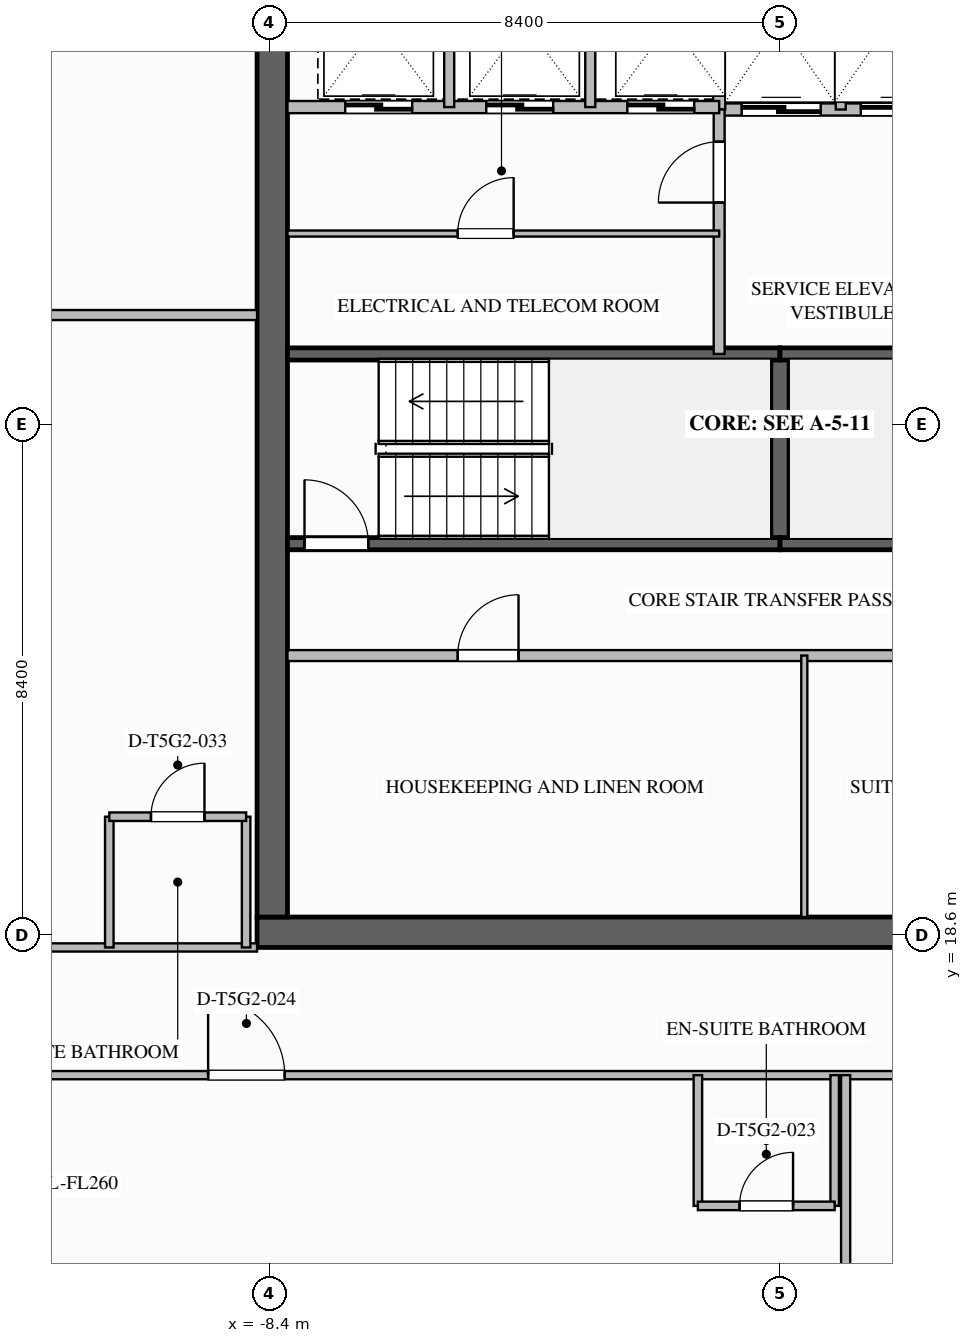
"""IFC4 building model, lengths in metres.
Left out: names, types, materials, properties, quantities, classifications, styles, units other than length and angle.
Written with IfcOpenShell. Run it as: python <this file> out.ifc"""

import sys

from ifc_helpers import new_model, si_unit, direction, frame, frame_2d, origin, place, context, subcontext, project, spatial, rectangle, extrude, element, fill, save


model = new_model("IFC4")
c1 = context("Model", 3, precision=1e-05, world=origin(), true_north=direction((0.0, 1.0)))
c2 = subcontext(c1, "Body", "Model", "MODEL_VIEW")
j1 = project(units=[si_unit("LENGTHUNIT", "METRE"), si_unit("PLANEANGLEUNIT", "RADIAN")], contexts=[c1])
p1 = place(None, origin())
s1 = spatial("IfcSite", under=j1, at=p1, CompositionType="ELEMENT")
p2 = place(p1, origin())
s2 = spatial("IfcBuilding", under=s1, at=p2, CompositionType="ELEMENT")
p3 = place(p2, frame((0.0, 0.0, 275.95)))
s3 = spatial("IfcBuildingStorey", under=s2, at=p3, CompositionType="ELEMENT", Elevation=275.95)
p4 = place(p3, frame((8.6, 18.65, 0.0), z_axis=(0.0, 0.0, 1.0), x_axis=(-1.0, 0.0, 0.0)))
e1 = element("IfcWall", 1, at=p4, inside=s3, PredefinedType="SHEAR", context=c2, shape_type="SweptSolid", body=[
    extrude(rectangle(XDim=17.2, YDim=0.5, at=frame_2d((8.6, 0.0))), origin(), (0.0, 0.0, 1.0), 3.65),
])
p5 = place(p3, frame((-8.35, 18.9, 0.0), z_axis=(0.0, 0.0, 1.0), x_axis=(0.0, 1.0, 0.0)))
e2 = element("IfcWall", 2, at=p5, inside=s3, PredefinedType="SHEAR", context=c2, shape_type="SweptSolid", body=[
    extrude(rectangle(XDim=16.2, YDim=0.5, at=frame_2d((8.1, 0.0))), origin(), (0.0, 0.0, 1.0), 3.65),
])
p6 = place(p3, frame((0.0, 25.04, 0.0), z_axis=(0.0, 0.0, 1.0), x_axis=(0.0, 1.0, 0.0)))
e3 = element("IfcWall", 3, at=p6, inside=s3, PredefinedType="SOLIDWALL", context=c2, shape_type="SweptSolid", body=[
    extrude(rectangle(XDim=3.12, YDim=0.3, at=frame_2d((1.56, 0.0))), origin(), (0.0, 0.0, 1.0), 3.39),
])
p7 = place(p3, frame((-8.1, 25.04, 0.0), z_axis=(0.0, 0.0, 1.0), x_axis=(1.0, 0.0, 0.0)))
e4 = element("IfcWall", 4, at=p7, inside=s3, PredefinedType="SOLIDWALL", context=c2, shape_type="SweptSolid", body=[
    extrude(rectangle(XDim=8.1, YDim=0.2, at=frame_2d((4.05, 0.0))), origin(), (0.0, 0.0, 1.0), 3.39),
])
p8 = place(p7, frame((0.28, 0.0, 0.0)))
e5 = element("IfcOpeningElement", 5, at=p8, cuts=e4, PredefinedType="OPENING", context=c2, shape_type="SweptSolid", body=[
    extrude(rectangle(XDim=1.05, YDim=2.1, at=frame_2d((0.525, 1.05))), frame((0.0, 0.11, 0.0), z_axis=(0.0, -1.0, 0.0), x_axis=(1.0, 0.0, 0.0)), (0.0, 0.0, 1.0), 0.22),
])
for number, where, z_axis, x_axis in (
    (6, (-8.1, 28.16, 0.0), (0.0, 0.0, 1.0), (1.0, 0.0, 0.0)),
    (7, (0.0, 25.04, 0.0), (0.0, 0.0, 1.0), (1.0, 0.0, 0.0)),
):
    element("IfcWall", number, at=place(p3, frame(where, z_axis=z_axis, x_axis=x_axis)), inside=s3, PredefinedType="SOLIDWALL", context=c2, shape_type="SweptSolid", body=[
        extrude(rectangle(XDim=8.1, YDim=0.2, at=frame_2d((4.05, 0.0))), origin(), (0.0, 0.0, 1.0), 3.39),
    ])
p9 = place(p3, frame((8.1, 28.16, 0.0), z_axis=(0.0, 0.0, 1.0), x_axis=(-1.0, 0.0, 0.0)))
e8 = element("IfcWall", 8, at=p9, inside=s3, PredefinedType="SOLIDWALL", context=c2, shape_type="SweptSolid", body=[
    extrude(rectangle(XDim=8.1, YDim=0.2, at=frame_2d((4.05, 0.0))), origin(), (0.0, 0.0, 1.0), 3.39),
])
p10 = place(p9, frame((0.28, 0.0, 0.0)))
e9 = element("IfcOpeningElement", 9, at=p10, cuts=e8, PredefinedType="OPENING", context=c2, shape_type="SweptSolid", body=[
    extrude(rectangle(XDim=1.05, YDim=2.1, at=frame_2d((0.525, 1.05))), frame((0.0, 0.11, 0.0), z_axis=(0.0, -1.0, 0.0), x_axis=(1.0, 0.0, 0.0)), (0.0, 0.0, 1.0), 0.22),
])
p11 = place(p3, frame((-1.0, 32.18, 0.0), z_axis=(0.0, 0.0, 1.0), x_axis=(1.0, 0.0, 0.0)))
e10 = element("IfcWall", 10, at=p11, inside=s3, PredefinedType="SOLIDWALL", context=c2, shape_type="SweptSolid", body=[
    extrude(rectangle(XDim=4.1, YDim=0.2, at=frame_2d((2.05, 0.0))), origin(), (0.0, 0.0, 1.0), 3.39),
])
p12 = place(p11, frame((0.37, 0.0, 0.0)))
e11 = element("IfcOpeningElement", 11, at=p12, cuts=e10, PredefinedType="OPENING", context=c2, shape_type="SweptSolid", body=[
    extrude(rectangle(XDim=1.3, YDim=2.2, at=frame_2d((0.65, 1.1))), frame((0.0, 0.11, 0.0), z_axis=(0.0, -1.0, 0.0), x_axis=(1.0, 0.0, 0.0)), (0.0, 0.0, 1.0), 0.22),
])
p13 = place(p11, frame((2.33, 0.0, 0.0)))
e12 = element("IfcOpeningElement", 12, at=p13, cuts=e10, PredefinedType="OPENING", context=c2, shape_type="SweptSolid", body=[
    extrude(rectangle(XDim=1.3, YDim=2.2, at=frame_2d((0.65, 1.1))), frame((0.0, 0.11, 0.0), z_axis=(0.0, -1.0, 0.0), x_axis=(1.0, 0.0, 0.0)), (0.0, 0.0, 1.0), 0.22),
])
p14 = place(p3, frame((-1.0, 32.18, 0.0), z_axis=(0.0, 0.0, 1.0), x_axis=(0.0, 1.0, 0.0)))
e13 = element("IfcWall", 13, at=p14, inside=s3, PredefinedType="SOLIDWALL", context=c2, shape_type="SweptSolid", body=[
    extrude(rectangle(XDim=2.92, YDim=0.2, at=frame_2d((1.46, 0.0))), origin(), (0.0, 0.0, 1.0), 3.39),
])
p15 = place(p3, frame((1.0, 32.18, 0.0), z_axis=(0.0, 0.0, 1.0), x_axis=(0.0, 1.0, 0.0)))
e14 = element("IfcWall", 14, at=p15, inside=s3, PredefinedType="PARTITIONING", context=c2, shape_type="SweptSolid", body=[
    extrude(rectangle(XDim=2.92, YDim=0.165, at=frame_2d((1.46, 0.0))), origin(), (0.0, 0.0, 1.0), 3.39),
])
p16 = place(p3, frame((-1.0, 28.16, 0.0), z_axis=(0.0, 0.0, 1.0), x_axis=(0.0, 1.0, 0.0)))
e15 = element("IfcWall", 15, at=p16, inside=s3, PredefinedType="SOLIDWALL", context=c2, shape_type="SweptSolid", body=[
    extrude(rectangle(XDim=4.02, YDim=0.18, at=frame_2d((2.01, 0.0))), origin(), (0.0, 0.0, 1.0), 3.39),
])
p17 = place(p16, frame((2.49, 0.0, 0.0)))
e16 = element("IfcOpeningElement", 16, at=p17, cuts=e15, PredefinedType="OPENING", context=c2, shape_type="SweptSolid", body=[
    extrude(rectangle(XDim=1.0, YDim=2.1, at=frame_2d((0.5, 1.05))), frame((0.0, 0.1, 0.0), z_axis=(0.0, -1.0, 0.0), x_axis=(1.0, 0.0, 0.0)), (0.0, 0.0, 1.0), 0.2),
])
p18 = place(p3, frame((-8.1, 32.22, 0.0), z_axis=(0.0, 0.0, 1.0), x_axis=(1.0, 0.0, 0.0)))
e17 = element("IfcWall", 17, at=p18, inside=s3, PredefinedType="SOLIDWALL", context=c2, shape_type="SweptSolid", body=[
    extrude(rectangle(XDim=7.1, YDim=0.2, at=frame_2d((3.55, 0.0))), origin(), (0.0, 0.0, 1.0), 3.39),
])
p19 = place(p18, frame((0.95, 0.0, 0.0)))
e18 = element("IfcOpeningElement", 18, at=p19, cuts=e17, PredefinedType="OPENING", context=c2, shape_type="SweptSolid", body=[
    extrude(rectangle(XDim=1.1, YDim=2.2, at=frame_2d((0.55, 1.1))), frame((0.0, 0.11, 0.0), z_axis=(0.0, -1.0, 0.0), x_axis=(1.0, 0.0, 0.0)), (0.0, 0.0, 1.0), 0.22),
])
p20 = place(p18, frame((3.27, 0.0, 0.0)))
e19 = element("IfcOpeningElement", 19, at=p20, cuts=e17, PredefinedType="OPENING", context=c2, shape_type="SweptSolid", body=[
    extrude(rectangle(XDim=1.1, YDim=2.2, at=frame_2d((0.55, 1.1))), frame((0.0, 0.11, 0.0), z_axis=(0.0, -1.0, 0.0), x_axis=(1.0, 0.0, 0.0)), (0.0, 0.0, 1.0), 0.22),
])
p21 = place(p18, frame((5.59, 0.0, 0.0)))
e20 = element("IfcOpeningElement", 20, at=p21, cuts=e17, PredefinedType="OPENING", context=c2, shape_type="SweptSolid", body=[
    extrude(rectangle(XDim=1.1, YDim=2.2, at=frame_2d((0.55, 1.1))), frame((0.0, 0.11, 0.0), z_axis=(0.0, -1.0, 0.0), x_axis=(1.0, 0.0, 0.0)), (0.0, 0.0, 1.0), 0.22),
])
for number, where, z_axis, x_axis in (
    (21, (-5.44, 32.22, 0.0), (0.0, 0.0, 1.0), (0.0, 1.0, 0.0)),
    (22, (-3.12, 32.22, 0.0), (0.0, 0.0, 1.0), (0.0, 1.0, 0.0)),
):
    element("IfcWall", number, at=place(p3, frame(where, z_axis=z_axis, x_axis=x_axis)), inside=s3, PredefinedType="PARTITIONING", context=c2, shape_type="SweptSolid", body=[
        extrude(rectangle(XDim=2.88, YDim=0.165, at=frame_2d((1.44, 0.0))), origin(), (0.0, 0.0, 1.0), 3.39),
    ])
p22 = place(p3, frame((-8.1, 30.14, 0.0), z_axis=(0.0, 0.0, 1.0), x_axis=(1.0, 0.0, 0.0)))
e23 = element("IfcWall", 23, at=p22, inside=s3, PredefinedType="PARTITIONING", context=c2, shape_type="SweptSolid", body=[
    extrude(rectangle(XDim=7.1, YDim=0.1, at=frame_2d((3.55, 0.0))), origin(), (0.0, 0.0, 1.0), 3.39),
])
p23 = place(p22, frame((2.8, 0.0, 0.0)))
e24 = element("IfcOpeningElement", 24, at=p23, cuts=e23, PredefinedType="OPENING", context=c2, shape_type="SweptSolid", body=[
    extrude(rectangle(XDim=0.92, YDim=2.1, at=frame_2d((0.46, 1.05))), frame((0.0, 0.06, 0.0), z_axis=(0.0, -1.0, 0.0), x_axis=(1.0, 0.0, 0.0)), (0.0, 0.0, 1.0), 0.12),
])
p24 = place(p3, frame((-8.1, 23.2, 0.0), z_axis=(0.0, 0.0, 1.0), x_axis=(1.0, 0.0, 0.0)))
e25 = element("IfcWall", 25, at=p24, inside=s3, PredefinedType="SOLIDWALL", context=c2, shape_type="SweptSolid", body=[
    extrude(rectangle(XDim=16.2, YDim=0.18, at=frame_2d((8.1, 0.0))), origin(), (0.0, 0.0, 1.0), 3.39),
])
p25 = place(p24, frame((2.8, 0.0, 0.0)))
e26 = element("IfcOpeningElement", 26, at=p25, cuts=e25, PredefinedType="OPENING", context=c2, shape_type="SweptSolid", body=[
    extrude(rectangle(XDim=1.0, YDim=2.1, at=frame_2d((0.5, 1.05))), frame((0.0, 0.1, 0.0), z_axis=(0.0, -1.0, 0.0), x_axis=(1.0, 0.0, 0.0)), (0.0, 0.0, 1.0), 0.2),
])
p26 = place(p24, frame((11.5, 0.0, 0.0)))
e27 = element("IfcOpeningElement", 27, at=p26, cuts=e25, PredefinedType="OPENING", context=c2, shape_type="SweptSolid", body=[
    extrude(rectangle(XDim=1.0, YDim=2.1, at=frame_2d((0.5, 1.05))), frame((0.0, 0.1, 0.0), z_axis=(0.0, -1.0, 0.0), x_axis=(1.0, 0.0, 0.0)), (0.0, 0.0, 1.0), 0.2),
])
p27 = place(p3, frame((0.4, 18.9, 0.0), z_axis=(0.0, 0.0, 1.0), x_axis=(0.0, 1.0, 0.0)))
e28 = element("IfcWall", 28, at=p27, inside=s3, PredefinedType="PARTITIONING", context=c2, shape_type="SweptSolid", body=[
    extrude(rectangle(XDim=4.3, YDim=0.1, at=frame_2d((2.15, 0.0))), origin(), (0.0, 0.0, 1.0), 3.39),
])
p28 = place(p3, frame((-16.2, 16.3, 0.0), z_axis=(0.0, 0.0, 1.0), x_axis=(1.0, 0.0, 0.0)))
e29 = element("IfcWall", 29, at=p28, inside=s3, PredefinedType="PARTITIONING", context=c2, shape_type="SweptSolid", body=[
    extrude(rectangle(XDim=38.28, YDim=0.135, at=frame_2d((19.14, 0.0))), origin(), (0.0, 0.0, 1.0), 3.39),
])
p29 = place(p28, frame((33.355, 0.0, 0.0)))
e30 = element("IfcOpeningElement", 30, at=p29, cuts=e29, PredefinedType="OPENING", context=c2, shape_type="SweptSolid", body=[
    extrude(rectangle(XDim=1.26, YDim=2.2, at=frame_2d((0.63, 1.1))), frame((0.0, 0.077, 0.0), z_axis=(0.0, -1.0, 0.0), x_axis=(1.0, 0.0, 0.0)), (0.0, 0.0, 1.0), 0.155),
])
p30 = place(p28, frame((6.795, 0.0, 0.0)))
e31 = element("IfcOpeningElement", 31, at=p30, cuts=e29, PredefinedType="OPENING", context=c2, shape_type="SweptSolid", body=[
    extrude(rectangle(XDim=1.26, YDim=2.2, at=frame_2d((0.63, 1.1))), frame((0.0, 0.077, 0.0), z_axis=(0.0, -1.0, 0.0), x_axis=(1.0, 0.0, 0.0)), (0.0, 0.0, 1.0), 0.155),
])
p31 = place(p28, frame((24.33, 0.0, 0.0)))
e32 = element("IfcOpeningElement", 32, at=p31, cuts=e29, PredefinedType="OPENING", context=c2, shape_type="SweptSolid", body=[
    extrude(rectangle(XDim=1.02, YDim=2.15, at=frame_2d((0.51, 1.075))), frame((0.0, 0.077, 0.0), z_axis=(0.0, -1.0, 0.0), x_axis=(1.0, 0.0, 0.0)), (0.0, 0.0, 1.0), 0.155),
])
p32 = place(p3, frame((-16.2, 18.4, 0.0), z_axis=(0.0, 0.0, 1.0), x_axis=(1.0, 0.0, 0.0)))
e33 = element("IfcWall", 33, at=p32, inside=s3, PredefinedType="PARTITIONING", context=c2, shape_type="SweptSolid", body=[
    extrude(rectangle(XDim=7.6, YDim=0.135, at=frame_2d((3.8, 0.0))), origin(), (0.0, 0.0, 1.0), 2.767),
])
p33 = place(p32, frame((2.155, 0.0, 0.0)))
e34 = element("IfcOpeningElement", 34, at=p33, cuts=e33, PredefinedType="OPENING", context=c2, shape_type="SweptSolid", body=[
    extrude(rectangle(XDim=1.26, YDim=2.2, at=frame_2d((0.63, 1.1))), frame((0.0, 0.077, 0.0), z_axis=(0.0, -1.0, 0.0), x_axis=(1.0, 0.0, 0.0)), (0.0, 0.0, 1.0), 0.155),
])
for number, where, z_axis, x_axis in (
    (35, (-1.35, 16.3, 0.0), (0.0, 0.0, 1.0), (0.0, -1.0, 0.0)),
    (36, (0.9, 16.3, 0.0), (0.0, 0.0, 1.0), (0.0, -1.0, 0.0)),
):
    element("IfcWall", number, at=place(p3, frame(where, z_axis=z_axis, x_axis=x_axis)), inside=s3, PredefinedType="PLUMBINGWALL", context=c2, shape_type="SweptSolid", body=[
        extrude(rectangle(XDim=2.15, YDim=0.14, at=frame_2d((1.075, 0.0))), origin(), (0.0, 0.0, 1.0), 3.39),
    ])
p34 = place(p3, frame((-1.35, 14.15, 0.0), z_axis=(0.0, 0.0, 1.0), x_axis=(1.0, 0.0, 0.0)))
e37 = element("IfcWall", 37, at=p34, inside=s3, PredefinedType="PLUMBINGWALL", context=c2, shape_type="SweptSolid", body=[
    extrude(rectangle(XDim=2.25, YDim=0.14, at=frame_2d((1.125, 0.0))), origin(), (0.0, 0.0, 1.0), 3.39),
])
p35 = place(p34, frame((0.685, 0.0, 0.0)))
e38 = element("IfcOpeningElement", 38, at=p35, cuts=e37, PredefinedType="OPENING", context=c2, shape_type="SweptSolid", body=[
    extrude(rectangle(XDim=0.88, YDim=2.1, at=frame_2d((0.44, 1.05))), frame((0.0, 0.08, 0.0), z_axis=(0.0, -1.0, 0.0), x_axis=(1.0, 0.0, 0.0)), (0.0, 0.0, 1.0), 0.16),
])
p36 = place(p3, frame((1.08, 5.6, 0.0), z_axis=(0.0, 0.0, 1.0), x_axis=(0.0, 1.0, 0.0)))
e39 = element("IfcWall", 39, at=p36, inside=s3, PredefinedType="PARTITIONING", context=c2, shape_type="SweptSolid", body=[
    extrude(rectangle(XDim=10.7, YDim=0.15, at=frame_2d((5.35, 0.0))), origin(), (0.0, 0.0, 1.0), 3.39),
])
p37 = place(p3, frame((-21.4, 28.8, 0.0), z_axis=(0.0, 0.0, 1.0), x_axis=(1.0, 0.0, 0.0)))
e40 = element("IfcWall", 40, at=p37, inside=s3, PredefinedType="PARTITIONING", context=c2, shape_type="SweptSolid", body=[
    extrude(rectangle(XDim=12.8, YDim=0.165, at=frame_2d((6.4, 0.0))), origin(), (0.0, 0.0, 1.0), 3.39),
])
for number, where, z_axis, x_axis in (
    (41, (-11.03, 18.4, 0.0), (0.0, 0.0, 1.0), (0.0, 1.0, 0.0)),
    (42, (-8.78, 18.4, 0.0), (0.0, 0.0, 1.0), (0.0, 1.0, 0.0)),
):
    element("IfcWall", number, at=place(p3, frame(where, z_axis=z_axis, x_axis=x_axis)), inside=s3, PredefinedType="PLUMBINGWALL", context=c2, shape_type="SweptSolid", body=[
        extrude(rectangle(XDim=2.15, YDim=0.14, at=frame_2d((1.075, 0.0))), origin(), (0.0, 0.0, 1.0), 3.39),
    ])
p38 = place(p3, frame((-11.03, 20.55, 0.0), z_axis=(0.0, 0.0, 1.0), x_axis=(1.0, 0.0, 0.0)))
e43 = element("IfcWall", 43, at=p38, inside=s3, PredefinedType="PLUMBINGWALL", context=c2, shape_type="SweptSolid", body=[
    extrude(rectangle(XDim=2.25, YDim=0.14, at=frame_2d((1.125, 0.0))), origin(), (0.0, 0.0, 1.0), 3.39),
])
p39 = place(p38, frame((0.685, 0.0, 0.0)))
e44 = element("IfcOpeningElement", 44, at=p39, cuts=e43, PredefinedType="OPENING", context=c2, shape_type="SweptSolid", body=[
    extrude(rectangle(XDim=0.88, YDim=2.1, at=frame_2d((0.44, 1.05))), frame((0.0, 0.08, 0.0), z_axis=(0.0, -1.0, 0.0), x_axis=(1.0, 0.0, 0.0)), (0.0, 0.0, 1.0), 0.16),
])
p40 = place(p8, origin())
e45 = element("IfcDoor", 45, at=p40, inside=s3, OperationType="SINGLE_SWING_LEFT", PredefinedType="DOOR", context=c2, shape_type="SweptSolid", body=[
    extrude(rectangle(XDim=1.05, YDim=2.1, at=frame_2d((0.525, 1.05))), frame((0.0, 0.025, 0.0), z_axis=(0.0, -1.0, 0.0), x_axis=(1.0, 0.0, 0.0)), (0.0, 0.0, 1.0), 0.05),
])
fill(e5, e45)
p41 = place(p12, origin())
e46 = element("IfcDoor", 46, at=p41, inside=s3, OperationType="SLIDING_TO_LEFT", PredefinedType="DOOR", context=c2, shape_type="SweptSolid", body=[
    extrude(rectangle(XDim=1.3, YDim=2.2, at=frame_2d((0.65, 1.1))), frame((0.0, 0.025, 0.0), z_axis=(0.0, -1.0, 0.0), x_axis=(1.0, 0.0, 0.0)), (0.0, 0.0, 1.0), 0.05),
])
fill(e11, e46)
p42 = place(p13, origin())
e47 = element("IfcDoor", 47, at=p42, inside=s3, OperationType="SLIDING_TO_LEFT", PredefinedType="DOOR", context=c2, shape_type="SweptSolid", body=[
    extrude(rectangle(XDim=1.3, YDim=2.2, at=frame_2d((0.65, 1.1))), frame((0.0, 0.025, 0.0), z_axis=(0.0, -1.0, 0.0), x_axis=(1.0, 0.0, 0.0)), (0.0, 0.0, 1.0), 0.05),
])
fill(e12, e47)
p43 = place(p17, origin())
e48 = element("IfcDoor", 48, at=p43, inside=s3, OperationType="SINGLE_SWING_LEFT", PredefinedType="DOOR", context=c2, shape_type="SweptSolid", body=[
    extrude(rectangle(XDim=1.0, YDim=2.1, at=frame_2d((0.5, 1.05))), frame((0.0, 0.025, 0.0), z_axis=(0.0, -1.0, 0.0), x_axis=(1.0, 0.0, 0.0)), (0.0, 0.0, 1.0), 0.05),
])
fill(e16, e48)
p44 = place(p19, origin())
e49 = element("IfcDoor", 49, at=p44, inside=s3, OperationType="SLIDING_TO_LEFT", PredefinedType="DOOR", context=c2, shape_type="SweptSolid", body=[
    extrude(rectangle(XDim=1.1, YDim=2.2, at=frame_2d((0.55, 1.1))), frame((0.0, 0.025, 0.0), z_axis=(0.0, -1.0, 0.0), x_axis=(1.0, 0.0, 0.0)), (0.0, 0.0, 1.0), 0.05),
])
fill(e18, e49)
p45 = place(p20, origin())
e50 = element("IfcDoor", 50, at=p45, inside=s3, OperationType="SLIDING_TO_LEFT", PredefinedType="DOOR", context=c2, shape_type="SweptSolid", body=[
    extrude(rectangle(XDim=1.1, YDim=2.2, at=frame_2d((0.55, 1.1))), frame((0.0, 0.025, 0.0), z_axis=(0.0, -1.0, 0.0), x_axis=(1.0, 0.0, 0.0)), (0.0, 0.0, 1.0), 0.05),
])
fill(e19, e50)
p46 = place(p21, origin())
e51 = element("IfcDoor", 51, at=p46, inside=s3, OperationType="SLIDING_TO_LEFT", PredefinedType="DOOR", context=c2, shape_type="SweptSolid", body=[
    extrude(rectangle(XDim=1.1, YDim=2.2, at=frame_2d((0.55, 1.1))), frame((0.0, 0.025, 0.0), z_axis=(0.0, -1.0, 0.0), x_axis=(1.0, 0.0, 0.0)), (0.0, 0.0, 1.0), 0.05),
])
fill(e20, e51)
p47 = place(p23, origin())
e52 = element("IfcDoor", 52, at=p47, inside=s3, OperationType="SINGLE_SWING_RIGHT", PredefinedType="DOOR", context=c2, shape_type="SweptSolid", body=[
    extrude(rectangle(XDim=0.92, YDim=2.1, at=frame_2d((0.46, 1.05))), frame((0.0, 0.025, 0.0), z_axis=(0.0, -1.0, 0.0), x_axis=(1.0, 0.0, 0.0)), (0.0, 0.0, 1.0), 0.05),
])
fill(e24, e52)
p48 = place(p25, origin())
e53 = element("IfcDoor", 53, at=p48, inside=s3, OperationType="SINGLE_SWING_RIGHT", PredefinedType="DOOR", context=c2, shape_type="SweptSolid", body=[
    extrude(rectangle(XDim=1.0, YDim=2.1, at=frame_2d((0.5, 1.05))), frame((0.0, 0.025, 0.0), z_axis=(0.0, -1.0, 0.0), x_axis=(1.0, 0.0, 0.0)), (0.0, 0.0, 1.0), 0.05),
])
fill(e26, e53)
p49 = place(p35, origin())
e54 = element("IfcDoor", 54, at=p49, inside=s3, OperationType="SINGLE_SWING_RIGHT", PredefinedType="DOOR", context=c2, shape_type="SweptSolid", body=[
    extrude(rectangle(XDim=0.88, YDim=2.1, at=frame_2d((0.44, 1.05))), frame((0.0, 0.025, 0.0), z_axis=(0.0, -1.0, 0.0), x_axis=(1.0, 0.0, 0.0)), (0.0, 0.0, 1.0), 0.05),
])
fill(e38, e54)
p50 = place(p30, origin())
e55 = element("IfcDoor", 55, at=p50, inside=s3, OperationType="SINGLE_SWING_LEFT", PredefinedType="DOOR", context=c2, shape_type="SweptSolid", body=[
    extrude(rectangle(XDim=1.26, YDim=2.2, at=frame_2d((0.63, 1.1))), frame((0.0, 0.025, 0.0), z_axis=(0.0, -1.0, 0.0), x_axis=(1.0, 0.0, 0.0)), (0.0, 0.0, 1.0), 0.05),
])
fill(e31, e55)
p51 = place(p39, origin())
e56 = element("IfcDoor", 56, at=p51, inside=s3, OperationType="SINGLE_SWING_RIGHT", PredefinedType="DOOR", context=c2, shape_type="SweptSolid", body=[
    extrude(rectangle(XDim=0.88, YDim=2.1, at=frame_2d((0.44, 1.05))), frame((0.0, 0.025, 0.0), z_axis=(0.0, -1.0, 0.0), x_axis=(1.0, 0.0, 0.0)), (0.0, 0.0, 1.0), 0.05),
])
fill(e44, e56)
save(model, sys.argv[1])
